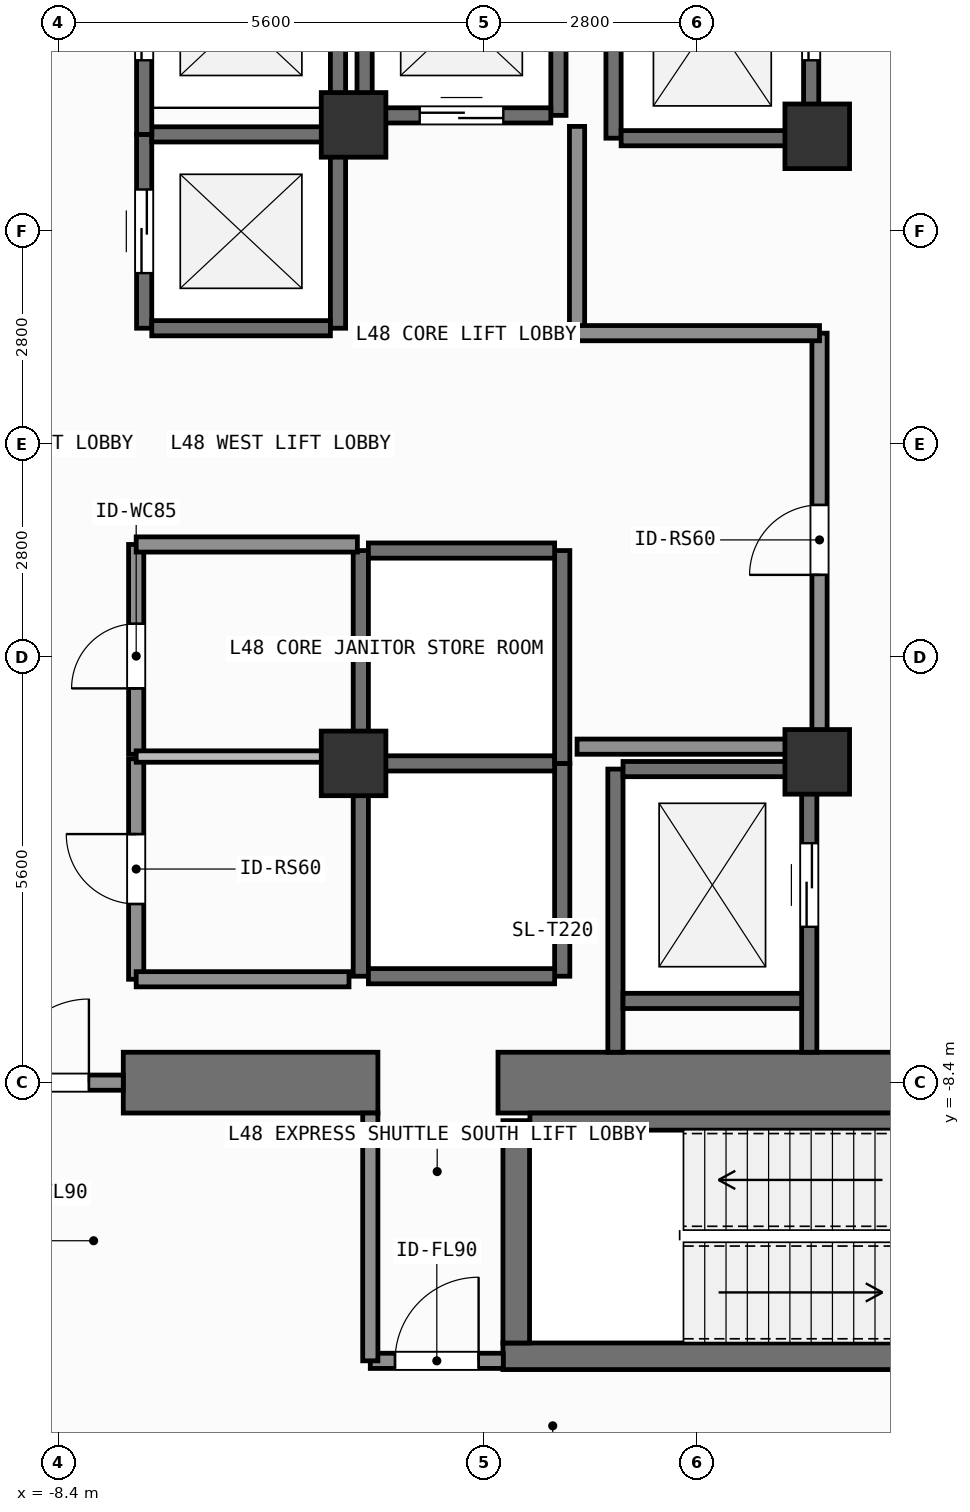
"""IFC4 building model, lengths in metres.
Left out: names, types, materials, properties, quantities, classifications, styles, units other than length and angle.
Written with IfcOpenShell. Run it as: python <this file> out.ifc"""

import sys

from ifc_helpers import new_model, si_unit, direction, frame, frame_2d, origin, origin_2d, place, context, subcontext, project, spatial, rectangle, extrude, element, fill, save


model = new_model("IFC4")
c1 = context("Model", 3, precision=1e-05, world=origin(), true_north=direction((0.0, 1.0)))
c2 = subcontext(c1, "Body", "Model", "MODEL_VIEW")
j1 = project(units=[si_unit("LENGTHUNIT", "METRE"), si_unit("PLANEANGLEUNIT", "RADIAN")], contexts=[c1])
p1 = place(None, origin())
s1 = spatial("IfcSite", under=j1, at=p1, CompositionType="ELEMENT")
p2 = place(p1, origin())
s2 = spatial("IfcBuilding", under=s1, at=p2, CompositionType="ELEMENT")
p3 = place(p2, frame((0.0, 0.0, 195.3)))
s3 = spatial("IfcBuildingStorey", under=s2, at=p3, CompositionType="ELEMENT", Elevation=195.3)
p4 = place(p3, frame((-7.55, -8.4, 0.0), z_axis=(0.0, 0.0, 1.0), x_axis=(1.0, 0.0, 0.0)))
e1 = element("IfcWall", 1, at=p4, inside=s3, PredefinedType="SHEAR", context=c2, shape_type="SweptSolid", body=[
    extrude(rectangle(XDim=3.35, YDim=0.8, at=frame_2d((1.675, 0.0))), origin(), (0.0, 0.0, 1.0), 3.9),
])
p5 = place(p3, frame((-2.62, -8.4, 0.0), z_axis=(0.0, 0.0, 1.0), x_axis=(1.0, 0.0, 0.0)))
e2 = element("IfcWall", 2, at=p5, inside=s3, PredefinedType="SHEAR", context=c2, shape_type="SweptSolid", body=[
    extrude(rectangle(XDim=7.27, YDim=0.8, at=frame_2d((3.635, 0.0))), origin(), (0.0, 0.0, 1.0), 3.9),
])
p6 = place(p3, frame((-2.555, -12.0, 0.0), z_axis=(0.0, 0.0, 1.0), x_axis=(1.0, 0.0, 0.0)))
e3 = element("IfcWall", 3, at=p6, inside=s3, PredefinedType="SHEAR", context=c2, shape_type="SweptSolid", body=[
    extrude(rectangle(XDim=7.31, YDim=0.35, at=frame_2d((3.655, 0.0))), origin(), (0.0, 0.0, 1.0), 3.9),
])
p7 = place(p3, frame((-2.2, -8.913, 0.0), z_axis=(0.0, 0.0, 1.0), x_axis=(1.0, 0.0, 0.0)))
e4 = element("IfcWall", 4, at=p7, inside=s3, PredefinedType="SHEAR", context=c2, shape_type="SweptSolid", body=[
    extrude(rectangle(XDim=6.6, YDim=0.225, at=frame_2d((3.3, 0.0))), origin(), (0.0, 0.0, 1.0), 3.9),
])
p8 = place(p3, frame((-2.38, -11.825, 0.0), z_axis=(0.0, 0.0, 1.0), x_axis=(0.0, 1.0, 0.0)))
e5 = element("IfcWall", 5, at=p8, inside=s3, PredefinedType="SHEAR", context=c2, shape_type="SweptSolid", body=[
    extrude(rectangle(XDim=2.925, YDim=0.35, at=frame_2d((1.462, 0.0))), origin(), (0.0, 0.0, 1.0), 3.9),
])
for number, where, z_axis, x_axis in (
    (6, (-4.52, -4.2, 0.0), (0.0, 0.0, 1.0), (1.0, 0.0, 0.0)),
    (7, (1.58, -4.18, 0.0), (0.0, 0.0, 1.0), (1.0, 0.0, 0.0)),
    (8, (1.58, 4.05, 0.0), (0.0, 0.0, 1.0), (1.0, 0.0, 0.0)),
    (9, (-4.52, 4.2, 0.0), (0.0, 0.0, 1.0), (1.0, 0.0, 0.0)),
):
    element("IfcColumn", number, at=place(p3, frame(where, z_axis=z_axis, x_axis=x_axis)), inside=s3, PredefinedType="COLUMN", context=c2, shape_type="SweptSolid", body=[
        extrude(rectangle(XDim=0.85, YDim=0.85, at=origin_2d()), origin(), (0.0, 0.0, 1.0), 3.9),
    ])
p9 = place(p3, frame((-7.275, 1.525, 0.0), z_axis=(0.0, 0.0, 1.0), x_axis=(0.0, 1.0, 0.0)))
e10 = element("IfcWall", 10, at=p9, inside=s3, PredefinedType="SHEAR", context=c2, shape_type="SweptSolid", body=[
    extrude(rectangle(XDim=2.55, YDim=0.2, at=frame_2d((1.275, 0.0))), origin(), (0.0, 0.0, 1.0), 3.68),
])
p10 = place(p9, frame((0.725, 0.0, 0.0)))
e11 = element("IfcOpeningElement", 11, at=p10, cuts=e10, PredefinedType="OPENING", context=c2, shape_type="SweptSolid", body=[
    extrude(rectangle(XDim=1.1, YDim=2.2, at=frame_2d((0.55, 1.1))), frame((0.0, 0.11, 0.0), z_axis=(0.0, -1.0, 0.0), x_axis=(1.0, 0.0, 0.0)), (0.0, 0.0, 1.0), 0.22),
])
p11 = place(p3, frame((-4.725, 1.525, 0.0), z_axis=(0.0, 0.0, 1.0), x_axis=(0.0, 1.0, 0.0)))
e12 = element("IfcWall", 12, at=p11, inside=s3, PredefinedType="SHEAR", context=c2, shape_type="SweptSolid", body=[
    extrude(rectangle(XDim=2.55, YDim=0.2, at=frame_2d((1.275, 0.0))), origin(), (0.0, 0.0, 1.0), 3.68),
])
for number, where, z_axis, x_axis in (
    (13, (-7.175, 1.525, 0.0), (0.0, 0.0, 1.0), (1.0, 0.0, 0.0)),
    (14, (-7.175, 4.075, 0.0), (0.0, 0.0, 1.0), (1.0, 0.0, 0.0)),
):
    element("IfcWall", number, at=place(p3, frame(where, z_axis=z_axis, x_axis=x_axis)), inside=s3, PredefinedType="SHEAR", context=c2, shape_type="SweptSolid", body=[
        extrude(rectangle(XDim=2.35, YDim=0.2, at=frame_2d((1.175, 0.0))), origin(), (0.0, 0.0, 1.0), 3.68),
    ])
p12 = place(p3, frame((-7.275, 4.075, 0.0), z_axis=(0.0, 0.0, 1.0), x_axis=(0.0, 1.0, 0.0)))
e15 = element("IfcWall", 15, at=p12, inside=s3, PredefinedType="SHEAR", context=c2, shape_type="SweptSolid", body=[
    extrude(rectangle(XDim=2.8, YDim=0.2, at=frame_2d((1.4, 0.0))), origin(), (0.0, 0.0, 1.0), 3.68),
])
p13 = place(p12, frame((0.975, 0.0, 0.0)))
e16 = element("IfcOpeningElement", 16, at=p13, cuts=e15, PredefinedType="OPENING", context=c2, shape_type="SweptSolid", body=[
    extrude(rectangle(XDim=1.1, YDim=2.2, at=frame_2d((0.55, 1.1))), frame((0.0, 0.11, 0.0), z_axis=(0.0, -1.0, 0.0), x_axis=(1.0, 0.0, 0.0)), (0.0, 0.0, 1.0), 0.22),
])
p14 = place(p3, frame((-4.725, 4.075, 0.0), z_axis=(0.0, 0.0, 1.0), x_axis=(0.0, 1.0, 0.0)))
e17 = element("IfcWall", 17, at=p14, inside=s3, PredefinedType="SHEAR", context=c2, shape_type="SweptSolid", body=[
    extrude(rectangle(XDim=2.8, YDim=0.2, at=frame_2d((1.4, 0.0))), origin(), (0.0, 0.0, 1.0), 3.68),
])
for number, where, z_axis, x_axis in (
    (18, (-4.375, 4.325, 0.0), (0.0, 0.0, 1.0), (0.0, 1.0, 0.0)),
    (19, (-1.825, 4.325, 0.0), (0.0, 0.0, 1.0), (0.0, 1.0, 0.0)),
):
    element("IfcWall", number, at=place(p3, frame(where, z_axis=z_axis, x_axis=x_axis)), inside=s3, PredefinedType="SHEAR", context=c2, shape_type="SweptSolid", body=[
        extrude(rectangle(XDim=2.55, YDim=0.2, at=frame_2d((1.275, 0.0))), origin(), (0.0, 0.0, 1.0), 3.68),
    ])
p15 = place(p3, frame((-4.275, 4.325, 0.0), z_axis=(0.0, 0.0, 1.0), x_axis=(1.0, 0.0, 0.0)))
e20 = element("IfcWall", 20, at=p15, inside=s3, PredefinedType="SHEAR", context=c2, shape_type="SweptSolid", body=[
    extrude(rectangle(XDim=2.35, YDim=0.2, at=frame_2d((1.175, 0.0))), origin(), (0.0, 0.0, 1.0), 3.68),
])
p16 = place(p15, frame((0.625, 0.0, 0.0)))
e21 = element("IfcOpeningElement", 21, at=p16, cuts=e20, PredefinedType="OPENING", context=c2, shape_type="SweptSolid", body=[
    extrude(rectangle(XDim=1.1, YDim=2.2, at=frame_2d((0.55, 1.1))), frame((0.0, 0.11, 0.0), z_axis=(0.0, -1.0, 0.0), x_axis=(1.0, 0.0, 0.0)), (0.0, 0.0, 1.0), 0.22),
])
for number, where, z_axis, x_axis in (
    (22, (-4.425, -7.0, 0.0), (0.0, 0.0, 1.0), (0.0, 1.0, 0.0)),
    (23, (-1.775, -7.0, 0.0), (0.0, 0.0, 1.0), (0.0, 1.0, 0.0)),
):
    element("IfcWall", number, at=place(p3, frame(where, z_axis=z_axis, x_axis=x_axis)), inside=s3, PredefinedType="SHEAR", context=c2, shape_type="SweptSolid", body=[
        extrude(rectangle(XDim=2.8, YDim=0.2, at=frame_2d((1.4, 0.0))), origin(), (0.0, 0.0, 1.0), 3.68),
    ])
for number, where, z_axis, x_axis in (
    (24, (-4.325, -7.0, 0.0), (0.0, 0.0, 1.0), (1.0, 0.0, 0.0)),
    (25, (-4.325, -4.2, 0.0), (0.0, 0.0, 1.0), (1.0, 0.0, 0.0)),
):
    element("IfcWall", number, at=place(p3, frame(where, z_axis=z_axis, x_axis=x_axis)), inside=s3, PredefinedType="SHEAR", context=c2, shape_type="SweptSolid", body=[
        extrude(rectangle(XDim=2.45, YDim=0.2, at=frame_2d((1.225, 0.0))), origin(), (0.0, 0.0, 1.0), 3.68),
    ])
for number, where, z_axis, x_axis in (
    (26, (-4.425, -4.2, 0.0), (0.0, 0.0, 1.0), (0.0, 1.0, 0.0)),
    (27, (-1.775, -4.2, 0.0), (0.0, 0.0, 1.0), (0.0, 1.0, 0.0)),
):
    element("IfcWall", number, at=place(p3, frame(where, z_axis=z_axis, x_axis=x_axis)), inside=s3, PredefinedType="SHEAR", context=c2, shape_type="SweptSolid", body=[
        extrude(rectangle(XDim=2.8, YDim=0.2, at=frame_2d((1.4, 0.0))), origin(), (0.0, 0.0, 1.0), 3.68),
    ])
p17 = place(p3, frame((-4.325, -1.4, 0.0), z_axis=(0.0, 0.0, 1.0), x_axis=(1.0, 0.0, 0.0)))
e28 = element("IfcWall", 28, at=p17, inside=s3, PredefinedType="SHEAR", context=c2, shape_type="SweptSolid", body=[
    extrude(rectangle(XDim=2.45, YDim=0.2, at=frame_2d((1.225, 0.0))), origin(), (0.0, 0.0, 1.0), 3.68),
])
p18 = place(p3, frame((-1.1, 4.025, 0.0), z_axis=(0.0, 0.0, 1.0), x_axis=(0.0, 1.0, 0.0)))
e29 = element("IfcWall", 29, at=p18, inside=s3, PredefinedType="SHEAR", context=c2, shape_type="SweptSolid", body=[
    extrude(rectangle(XDim=3.15, YDim=0.2, at=frame_2d((1.575, 0.0))), origin(), (0.0, 0.0, 1.0), 3.68),
])
p19 = place(p3, frame((1.5, 4.025, 0.0), z_axis=(0.0, 0.0, 1.0), x_axis=(0.0, 1.0, 0.0)))
e30 = element("IfcWall", 30, at=p19, inside=s3, PredefinedType="SHEAR", context=c2, shape_type="SweptSolid", body=[
    extrude(rectangle(XDim=3.15, YDim=0.2, at=frame_2d((1.575, 0.0))), origin(), (0.0, 0.0, 1.0), 3.68),
])
p20 = place(p19, frame((1.025, 0.0, 0.0)))
e31 = element("IfcOpeningElement", 31, at=p20, cuts=e30, PredefinedType="OPENING", context=c2, shape_type="SweptSolid", body=[
    extrude(rectangle(XDim=1.1, YDim=2.2, at=frame_2d((0.55, 1.1))), frame((0.0, 0.11, 0.0), z_axis=(0.0, -1.0, 0.0), x_axis=(1.0, 0.0, 0.0)), (0.0, 0.0, 1.0), 0.22),
])
p21 = place(p3, frame((-1.0, 4.025, 0.0), z_axis=(0.0, 0.0, 1.0), x_axis=(1.0, 0.0, 0.0)))
e32 = element("IfcWall", 32, at=p21, inside=s3, PredefinedType="SHEAR", context=c2, shape_type="SweptSolid", body=[
    extrude(rectangle(XDim=2.4, YDim=0.2, at=frame_2d((1.2, 0.0))), origin(), (0.0, 0.0, 1.0), 3.68),
])
p22 = place(p3, frame((-1.075, -8.0, 0.0), z_axis=(0.0, 0.0, 1.0), x_axis=(0.0, 1.0, 0.0)))
e33 = element("IfcWall", 33, at=p22, inside=s3, PredefinedType="SHEAR", context=c2, shape_type="SweptSolid", body=[
    extrude(rectangle(XDim=3.725, YDim=0.2, at=frame_2d((1.863, 0.0))), origin(), (0.0, 0.0, 1.0), 3.68),
])
p23 = place(p3, frame((1.475, -8.0, 0.0), z_axis=(0.0, 0.0, 1.0), x_axis=(0.0, 1.0, 0.0)))
e34 = element("IfcWall", 34, at=p23, inside=s3, PredefinedType="SHEAR", context=c2, shape_type="SweptSolid", body=[
    extrude(rectangle(XDim=3.725, YDim=0.2, at=frame_2d((1.863, 0.0))), origin(), (0.0, 0.0, 1.0), 3.68),
])
p24 = place(p23, frame((1.65, 0.0, 0.0)))
e35 = element("IfcOpeningElement", 35, at=p24, cuts=e34, PredefinedType="OPENING", context=c2, shape_type="SweptSolid", body=[
    extrude(rectangle(XDim=1.1, YDim=2.2, at=frame_2d((0.55, 1.1))), frame((0.0, 0.11, 0.0), z_axis=(0.0, -1.0, 0.0), x_axis=(1.0, 0.0, 0.0)), (0.0, 0.0, 1.0), 0.22),
])
for number, where, z_axis, x_axis in (
    (36, (-0.975, -7.325, 0.0), (0.0, 0.0, 1.0), (1.0, 0.0, 0.0)),
    (37, (-0.975, -4.275, 0.0), (0.0, 0.0, 1.0), (1.0, 0.0, 0.0)),
):
    element("IfcWall", number, at=place(p3, frame(where, z_axis=z_axis, x_axis=x_axis)), inside=s3, PredefinedType="SHEAR", context=c2, shape_type="SweptSolid", body=[
        extrude(rectangle(XDim=2.35, YDim=0.2, at=frame_2d((1.175, 0.0))), origin(), (0.0, 0.0, 1.0), 3.68),
    ])
p25 = place(p3, frame((-9.7, -8.4, 0.0), z_axis=(0.0, 0.0, 1.0), x_axis=(1.0, 0.0, 0.0)))
e38 = element("IfcWall", 38, at=p25, inside=s3, PredefinedType="SOLIDWALL", context=c2, shape_type="SweptSolid", body=[
    extrude(rectangle(XDim=2.15, YDim=0.2, at=frame_2d((1.075, 0.0))), origin(), (0.0, 0.0, 1.0), 2.82),
])
p26 = place(p25, frame((0.598, 0.0, 0.0)))
e39 = element("IfcOpeningElement", 39, at=p26, cuts=e38, PredefinedType="OPENING", context=c2, shape_type="SweptSolid", body=[
    extrude(rectangle(XDim=1.1, YDim=2.15, at=frame_2d((0.55, 1.075))), frame((0.0, 0.11, 0.0), z_axis=(0.0, -1.0, 0.0), x_axis=(1.0, 0.0, 0.0)), (0.0, 0.0, 1.0), 0.22),
])
p27 = place(p3, frame((-4.3, -12.06, 0.0), z_axis=(0.0, 0.0, 1.0), x_axis=(1.0, 0.0, 0.0)))
e40 = element("IfcWall", 40, at=p27, inside=s3, PredefinedType="SOLIDWALL", context=c2, shape_type="SweptSolid", body=[
    extrude(rectangle(XDim=1.75, YDim=0.2, at=frame_2d((0.875, 0.0))), origin(), (0.0, 0.0, 1.0), 3.68),
])
p28 = place(p27, frame((0.325, 0.0, 0.0)))
e41 = element("IfcOpeningElement", 41, at=p28, cuts=e40, PredefinedType="OPENING", context=c2, shape_type="SweptSolid", body=[
    extrude(rectangle(XDim=1.1, YDim=2.15, at=frame_2d((0.55, 1.075))), frame((0.0, 0.11, 0.0), z_axis=(0.0, -1.0, 0.0), x_axis=(1.0, 0.0, 0.0)), (0.0, 0.0, 1.0), 0.22),
])
p29 = place(p3, frame((1.61, -3.98, 0.0), z_axis=(0.0, 0.0, 1.0), x_axis=(0.0, 1.0, 0.0)))
e42 = element("IfcWall", 42, at=p29, inside=s3, PredefinedType="SOLIDWALL", context=c2, shape_type="SweptSolid", body=[
    extrude(rectangle(XDim=5.44, YDim=0.2, at=frame_2d((2.72, 0.0))), origin(), (0.0, 0.0, 1.0), 3.68),
])
p30 = place(p29, frame((2.26, 0.0, 0.0)))
e43 = element("IfcOpeningElement", 43, at=p30, cuts=e42, PredefinedType="OPENING", context=c2, shape_type="SweptSolid", body=[
    extrude(rectangle(XDim=0.92, YDim=2.1, at=frame_2d((0.46, 1.05))), frame((0.0, 0.11, 0.0), z_axis=(0.0, -1.0, 0.0), x_axis=(1.0, 0.0, 0.0)), (0.0, 0.0, 1.0), 0.22),
])
p31 = place(p3, frame((-7.38, -7.04, 0.0), z_axis=(0.0, 0.0, 1.0), x_axis=(0.0, 1.0, 0.0)))
e44 = element("IfcWall", 44, at=p31, inside=s3, PredefinedType="SOLIDWALL", context=c2, shape_type="SweptSolid", body=[
    extrude(rectangle(XDim=2.9, YDim=0.2, at=frame_2d((1.45, 0.0))), origin(), (0.0, 0.0, 1.0), 3.68),
])
p32 = place(p31, frame((0.99, 0.0, 0.0)))
e45 = element("IfcOpeningElement", 45, at=p32, cuts=e44, PredefinedType="OPENING", context=c2, shape_type="SweptSolid", body=[
    extrude(rectangle(XDim=0.92, YDim=2.1, at=frame_2d((0.46, 1.05))), frame((0.0, 0.11, 0.0), z_axis=(0.0, -1.0, 0.0), x_axis=(1.0, 0.0, 0.0)), (0.0, 0.0, 1.0), 0.22),
])
p33 = place(p3, frame((-7.38, -4.08, 0.0), z_axis=(0.0, 0.0, 1.0), x_axis=(0.0, 1.0, 0.0)))
e46 = element("IfcWall", 46, at=p33, inside=s3, PredefinedType="SOLIDWALL", context=c2, shape_type="SweptSolid", body=[
    extrude(rectangle(XDim=2.76, YDim=0.2, at=frame_2d((1.38, 0.0))), origin(), (0.0, 0.0, 1.0), 3.68),
])
p34 = place(p33, frame((0.867, 0.0, 0.0)))
e47 = element("IfcOpeningElement", 47, at=p34, cuts=e46, PredefinedType="OPENING", context=c2, shape_type="SweptSolid", body=[
    extrude(rectangle(XDim=0.85, YDim=2.1, at=frame_2d((0.425, 1.05))), frame((0.0, 0.11, 0.0), z_axis=(0.0, -1.0, 0.0), x_axis=(1.0, 0.0, 0.0)), (0.0, 0.0, 1.0), 0.22),
])
p35 = place(p3, frame((-4.3, -12.06, 0.0), z_axis=(0.0, 0.0, 1.0), x_axis=(0.0, 1.0, 0.0)))
e48 = element("IfcWall", 48, at=p35, inside=s3, PredefinedType="SOLIDWALL", context=c2, shape_type="SweptSolid", body=[
    extrude(rectangle(XDim=3.26, YDim=0.2, at=frame_2d((1.63, 0.0))), origin(), (0.0, 0.0, 1.0), 3.68),
])
p36 = place(p3, frame((-7.38, -1.32, 0.0), z_axis=(0.0, 0.0, 1.0), x_axis=(1.0, 0.0, 0.0)))
e49 = element("IfcWall", 49, at=p36, inside=s3, PredefinedType="SOLIDWALL", context=c2, shape_type="SweptSolid", body=[
    extrude(rectangle(XDim=2.91, YDim=0.2, at=frame_2d((1.455, 0.0))), origin(), (0.0, 0.0, 1.0), 3.68),
])
p37 = place(p3, frame((-1.58, 1.48, 0.0), z_axis=(0.0, 0.0, 1.0), x_axis=(0.0, 1.0, 0.0)))
e50 = element("IfcWall", 50, at=p37, inside=s3, PredefinedType="SOLIDWALL", context=c2, shape_type="SweptSolid", body=[
    extrude(rectangle(XDim=2.7, YDim=0.2, at=frame_2d((1.35, 0.0))), origin(), (0.0, 0.0, 1.0), 3.68),
])
for number, where, z_axis, x_axis in (
    (51, (-1.58, -3.98, 0.0), (0.0, 0.0, 1.0), (1.0, 0.0, 0.0)),
    (52, (-1.58, 1.46, 0.0), (0.0, 0.0, 1.0), (1.0, 0.0, 0.0)),
):
    element("IfcWall", number, at=place(p3, frame(where, z_axis=z_axis, x_axis=x_axis)), inside=s3, PredefinedType="SOLIDWALL", context=c2, shape_type="SweptSolid", body=[
        extrude(rectangle(XDim=3.19, YDim=0.2, at=frame_2d((1.595, 0.0))), origin(), (0.0, 0.0, 1.0), 3.68),
    ])
p38 = place(p3, frame((-7.38, -7.04, 0.0), z_axis=(0.0, 0.0, 1.0), x_axis=(1.0, 0.0, 0.0)))
e53 = element("IfcWall", 53, at=p38, inside=s3, PredefinedType="SOLIDWALL", context=c2, shape_type="SweptSolid", body=[
    extrude(rectangle(XDim=2.8, YDim=0.2, at=frame_2d((1.4, 0.0))), origin(), (0.0, 0.0, 1.0), 3.68),
])
p39 = place(p3, frame((-7.38, -4.11, 0.0), z_axis=(0.0, 0.0, 1.0), x_axis=(1.0, 0.0, 0.0)))
e54 = element("IfcWall", 54, at=p39, inside=s3, PredefinedType="PARTITIONING", context=c2, shape_type="SweptSolid", body=[
    extrude(rectangle(XDim=2.8, YDim=0.15, at=frame_2d((1.4, 0.0))), origin(), (0.0, 0.0, 1.0), 3.68),
])
p40 = place(p10, origin())
e55 = element("IfcDoor", 55, at=p40, inside=s3, OperationType="SLIDING_TO_LEFT", PredefinedType="DOOR", context=c2, shape_type="SweptSolid", body=[
    extrude(rectangle(XDim=1.1, YDim=2.2, at=frame_2d((0.55, 1.1))), frame((0.0, 0.025, 0.0), z_axis=(0.0, -1.0, 0.0), x_axis=(1.0, 0.0, 0.0)), (0.0, 0.0, 1.0), 0.05),
])
fill(e11, e55)
p41 = place(p13, origin())
e56 = element("IfcDoor", 56, at=p41, inside=s3, OperationType="SLIDING_TO_LEFT", PredefinedType="DOOR", context=c2, shape_type="SweptSolid", body=[
    extrude(rectangle(XDim=1.1, YDim=2.2, at=frame_2d((0.55, 1.1))), frame((0.0, 0.025, 0.0), z_axis=(0.0, -1.0, 0.0), x_axis=(1.0, 0.0, 0.0)), (0.0, 0.0, 1.0), 0.05),
])
fill(e16, e56)
p42 = place(p16, origin())
e57 = element("IfcDoor", 57, at=p42, inside=s3, OperationType="SLIDING_TO_LEFT", PredefinedType="DOOR", context=c2, shape_type="SweptSolid", body=[
    extrude(rectangle(XDim=1.1, YDim=2.2, at=frame_2d((0.55, 1.1))), frame((0.0, 0.025, 0.0), z_axis=(0.0, -1.0, 0.0), x_axis=(1.0, 0.0, 0.0)), (0.0, 0.0, 1.0), 0.05),
])
fill(e21, e57)
p43 = place(p20, origin())
e58 = element("IfcDoor", 58, at=p43, inside=s3, OperationType="SLIDING_TO_LEFT", PredefinedType="DOOR", context=c2, shape_type="SweptSolid", body=[
    extrude(rectangle(XDim=1.1, YDim=2.2, at=frame_2d((0.55, 1.1))), frame((0.0, 0.025, 0.0), z_axis=(0.0, -1.0, 0.0), x_axis=(1.0, 0.0, 0.0)), (0.0, 0.0, 1.0), 0.05),
])
fill(e31, e58)
p44 = place(p24, origin())
e59 = element("IfcDoor", 59, at=p44, inside=s3, OperationType="SLIDING_TO_LEFT", PredefinedType="DOOR", context=c2, shape_type="SweptSolid", body=[
    extrude(rectangle(XDim=1.1, YDim=2.2, at=frame_2d((0.55, 1.1))), frame((0.0, 0.025, 0.0), z_axis=(0.0, -1.0, 0.0), x_axis=(1.0, 0.0, 0.0)), (0.0, 0.0, 1.0), 0.05),
])
fill(e35, e59)
p45 = place(p26, origin())
e60 = element("IfcDoor", 60, at=p45, inside=s3, OperationType="SINGLE_SWING_RIGHT", PredefinedType="DOOR", context=c2, shape_type="SweptSolid", body=[
    extrude(rectangle(XDim=1.1, YDim=2.15, at=frame_2d((0.55, 1.075))), frame((0.0, 0.025, 0.0), z_axis=(0.0, -1.0, 0.0), x_axis=(1.0, 0.0, 0.0)), (0.0, 0.0, 1.0), 0.05),
])
fill(e39, e60)
p46 = place(p28, origin())
e61 = element("IfcDoor", 61, at=p46, inside=s3, OperationType="SINGLE_SWING_RIGHT", PredefinedType="DOOR", context=c2, shape_type="SweptSolid", body=[
    extrude(rectangle(XDim=1.1, YDim=2.15, at=frame_2d((0.55, 1.075))), frame((0.0, 0.025, 0.0), z_axis=(0.0, -1.0, 0.0), x_axis=(1.0, 0.0, 0.0)), (0.0, 0.0, 1.0), 0.05),
])
fill(e41, e61)
p47 = place(p30, origin())
e62 = element("IfcDoor", 62, at=p47, inside=s3, OperationType="SINGLE_SWING_LEFT", PredefinedType="DOOR", context=c2, shape_type="SweptSolid", body=[
    extrude(rectangle(XDim=0.92, YDim=2.1, at=frame_2d((0.46, 1.05))), frame((0.0, 0.025, 0.0), z_axis=(0.0, -1.0, 0.0), x_axis=(1.0, 0.0, 0.0)), (0.0, 0.0, 1.0), 0.05),
])
fill(e43, e62)
p48 = place(p32, origin())
e63 = element("IfcDoor", 63, at=p48, inside=s3, OperationType="SINGLE_SWING_RIGHT", PredefinedType="DOOR", context=c2, shape_type="SweptSolid", body=[
    extrude(rectangle(XDim=0.92, YDim=2.1, at=frame_2d((0.46, 1.05))), frame((0.0, 0.025, 0.0), z_axis=(0.0, -1.0, 0.0), x_axis=(1.0, 0.0, 0.0)), (0.0, 0.0, 1.0), 0.05),
])
fill(e45, e63)
p49 = place(p34, origin())
e64 = element("IfcDoor", 64, at=p49, inside=s3, OperationType="SINGLE_SWING_LEFT", PredefinedType="DOOR", context=c2, shape_type="SweptSolid", body=[
    extrude(rectangle(XDim=0.85, YDim=2.1, at=frame_2d((0.425, 1.05))), frame((0.0, 0.025, 0.0), z_axis=(0.0, -1.0, 0.0), x_axis=(1.0, 0.0, 0.0)), (0.0, 0.0, 1.0), 0.05),
])
fill(e47, e64)
save(model, sys.argv[1])
